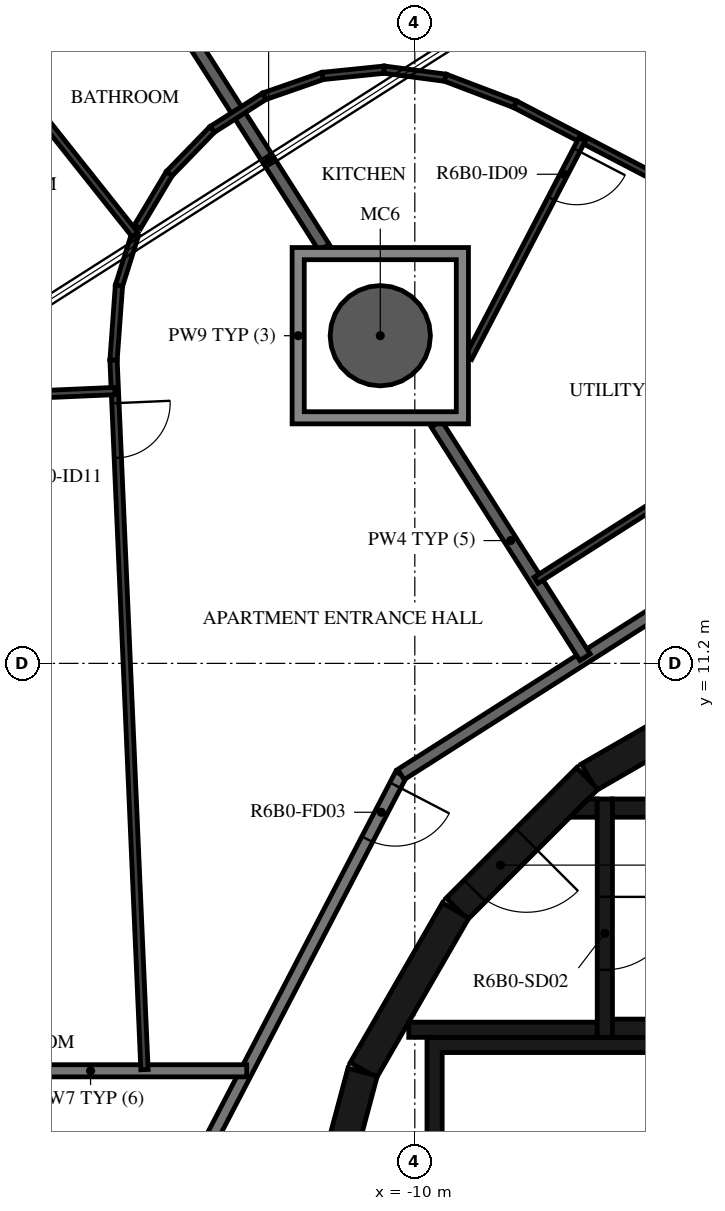
"""IFC4 building model, lengths in metres.
Left out: names, types, materials, properties, quantities, classifications, styles, units other than length and angle.
Written with IfcOpenShell. Run it as: python <this file> out.ifc"""

import sys

from ifc_helpers import new_model, si_unit, direction, frame, frame_2d, origin, origin_2d, place, context, subcontext, project, spatial, polyline, rectangle, hollow_circle, outline, extrude, element, fill, save


model = new_model("IFC4")
c1 = context("Model", 3, precision=1e-05, world=origin(), true_north=direction((0.0, 1.0)))
c2 = subcontext(c1, "Body", "Model", "MODEL_VIEW")
j1 = project(units=[si_unit("LENGTHUNIT", "METRE"), si_unit("PLANEANGLEUNIT", "RADIAN")], contexts=[c1])
p1 = place(None, origin())
s1 = spatial("IfcSite", under=j1, at=p1, CompositionType="ELEMENT")
p2 = place(p1, origin())
s2 = spatial("IfcBuilding", under=s1, at=p2, CompositionType="ELEMENT")
p3 = place(p2, frame((0.0, 0.0, 240.7)))
s3 = spatial("IfcBuildingStorey", under=s2, at=p3, CompositionType="ELEMENT", Elevation=240.7)
p4 = place(p3, frame((-10.568, 16.588, -0.38), z_axis=(0.0, 0.0, 1.0), x_axis=(1.0, 0.0, 0.0)))
e1 = element("IfcColumn", 1, at=p4, inside=s3, PredefinedType="COLUMN", context=c2, shape_type="SweptSolid", body=[
    extrude(hollow_circle(Radius=0.825, WallThickness=0.04, at=origin_2d()), origin(), (0.0, 0.0, 1.0), 3.5),
])
p5 = place(p3, frame((-4.51, 10.845, 0.0), z_axis=(0.0, 0.0, 1.0), x_axis=(-0.865975092491, -0.500087131594, 0.0)))
e2 = element("IfcWall", 2, at=p5, inside=s3, PredefinedType="SHEAR", context=c2, shape_type="SweptSolid", body=[
    extrude(rectangle(XDim=3.033, YDim=0.5, at=frame_2d((1.516, 0.0))), origin(), (0.0, 0.0, 1.0), 3.12),
])
p6 = place(p3, frame((-7.164, 9.308, 0.0), z_axis=(0.0, 0.0, 1.0), x_axis=(-0.707106781187, -0.707106781187, 0.0)))
e3 = element("IfcWall", 3, at=p6, inside=s3, PredefinedType="SHEAR", context=c2, shape_type="SweptSolid", body=[
    extrude(rectangle(XDim=3.032, YDim=0.5, at=frame_2d((1.516, 0.0))), origin(), (0.0, 0.0, 1.0), 3.12),
])
p7 = place(p6, frame((1.416, 0.0, 0.0)))
e4 = element("IfcOpeningElement", 4, at=p7, cuts=e3, PredefinedType="OPENING", context=c2, shape_type="SweptSolid", body=[
    extrude(rectangle(XDim=1.2, YDim=2.1, at=frame_2d((0.6, 1.05))), frame((0.0, 0.26, 0.0), z_axis=(0.0, -1.0, 0.0), x_axis=(1.0, 0.0, 0.0)), (0.0, 0.0, 1.0), 0.52),
])
for number, where, z_axis, x_axis in (
    (5, (-9.329, 7.137, 0.0), (0.0, 0.0, 1.0), (-0.5, -0.866, 0.0)),
    (6, (-10.858, 4.479, 0.0), (0.0, 0.0, 1.0), (-0.259, -0.966, 0.0)),
):
    element("IfcWall", number, at=place(p3, frame(where, z_axis=z_axis, x_axis=x_axis)), inside=s3, PredefinedType="SHEAR", context=c2, shape_type="SweptSolid", body=[
        extrude(rectangle(XDim=3.033, YDim=0.5, at=frame_2d((1.516, 0.0))), origin(), (0.0, 0.0, 1.0), 3.12),
    ])
for number, where, z_axis, x_axis in (
    (7, (-6.75, 5.2, 0.0), (0.0, 0.0, 1.0), (1.0, 0.0, 0.0)),
    (8, (-6.75, 8.82, 0.0), (0.0, 0.0, 1.0), (1.0, 0.0, 0.0)),
):
    element("IfcWall", number, at=place(p3, frame(where, z_axis=z_axis, x_axis=x_axis)), inside=s3, PredefinedType="SHEAR", context=c2, shape_type="SweptSolid", body=[
        extrude(rectangle(XDim=6.75, YDim=0.3, at=frame_2d((3.375, 0.0))), origin(), (0.0, 0.0, 1.0), 3.12),
    ])
p8 = place(p3, frame((-6.875, 8.97, 0.0), z_axis=(0.0, 0.0, 1.0), x_axis=(0.0, -1.0, 0.0)))
e9 = element("IfcWall", 9, at=p8, inside=s3, PredefinedType="SHEAR", context=c2, shape_type="SweptSolid", body=[
    extrude(rectangle(XDim=3.92, YDim=0.25, at=frame_2d((1.96, 0.0))), origin(), (0.0, 0.0, 1.0), 3.12),
])
p9 = place(p8, frame((1.61, 0.0, 0.0)))
e10 = element("IfcOpeningElement", 10, at=p9, cuts=e9, PredefinedType="OPENING", context=c2, shape_type="SweptSolid", body=[
    extrude(rectangle(XDim=1.2, YDim=2.1, at=frame_2d((0.6, 1.05))), frame((0.0, 0.135, 0.0), z_axis=(0.0, -1.0, 0.0), x_axis=(1.0, 0.0, 0.0)), (0.0, 0.0, 1.0), 0.27),
])
p10 = place(p3, frame((-7.0, 5.175, 0.0), z_axis=(0.0, 0.0, 1.0), x_axis=(-1.0, 0.0, 0.0)))
e11 = element("IfcWall", 11, at=p10, inside=s3, PredefinedType="SHEAR", context=c2, shape_type="SweptSolid", body=[
    extrude(rectangle(XDim=3.1, YDim=0.25, at=frame_2d((1.55, 0.0))), origin(), (0.0, 0.0, 1.0), 3.12),
])
p11 = place(p3, origin())
e12 = element("IfcWall", 12, at=p11, inside=s3, PredefinedType="SHEAR", context=c2, shape_type="SweptSolid", body=[
    extrude(outline(polyline([(-7.148, 8.97), (-7.0, 8.97), (-7.0, 8.67), (-7.448, 8.67), (-7.148, 8.97)])), origin(), (0.0, 0.0, 1.0), 3.12),
])
p12 = place(p3, origin())
e13 = element("IfcWall", 13, at=p12, inside=s3, PredefinedType="SHEAR", context=c2, shape_type="SweptSolid", body=[
    extrude(outline(polyline([(-9.55, 4.8), (-5.5, 4.8), (-5.5, 1.9), (-5.25, 1.9), (-5.25, 4.8), (-1.2, 4.8), (-1.2, 1.9), (-0.95, 1.9), (-0.95, 4.8), (0.95, 4.8), (0.95, 1.9), (1.2, 1.9), (1.2, 4.8), (3.1, 4.8), (3.1, 1.9), (3.35, 1.9), (3.35, 4.8), (5.25, 4.8), (5.25, 1.9), (5.5, 1.9), (5.5, 4.8), (7.4, 4.8), (7.4, 1.9), (7.65, 1.9), (7.65, 4.8), (9.55, 4.8), (9.55, 1.9), (9.8, 1.9), (9.8, 4.8), (9.8, 5.05), (-9.8, 5.05), (-9.8, 4.8), (-9.8, 1.9), (-9.55, 1.9), (-9.55, 4.8)])), origin(), (0.0, 0.0, 1.0), 3.12),
])
p13 = place(p3, frame((-10.228, 9.372, 0.0), z_axis=(0.0, 0.0, 1.0), x_axis=(-0.461759464021, -0.887005184532, 0.0)))
e14 = element("IfcWall", 14, at=p13, inside=s3, PredefinedType="STANDARD", context=c2, shape_type="SweptSolid", body=[
    extrude(rectangle(XDim=7.181, YDim=0.2, at=frame_2d((3.591, 0.0))), origin(), (0.0, 0.0, 1.0), 3.12),
])
p14 = place(p13, frame((0.2, 0.0, 0.0)))
e15 = element("IfcOpeningElement", 15, at=p14, cuts=e14, PredefinedType="OPENING", context=c2, shape_type="SweptSolid", body=[
    extrude(rectangle(XDim=1.0, YDim=2.1, at=frame_2d((0.5, 1.05))), frame((0.0, 0.11, 0.0), z_axis=(0.0, -1.0, 0.0), x_axis=(1.0, 0.0, 0.0)), (0.0, 0.0, 1.0), 0.22),
])
p15 = place(p3, frame((-4.172, 13.231, 0.0), z_axis=(0.0, 0.0, 1.0), x_axis=(-0.843388394728, -0.537304397561, 0.0)))
e16 = element("IfcWall", 16, at=p15, inside=s3, PredefinedType="STANDARD", context=c2, shape_type="SweptSolid", body=[
    extrude(rectangle(XDim=7.181, YDim=0.2, at=frame_2d((3.59, 0.0))), origin(), (0.0, 0.0, 1.0), 3.12),
])
p16 = place(p3, frame((-12.764, 4.5, 0.0), z_axis=(0.0, 0.0, 1.0), x_axis=(-1.0, 0.0, 0.0)))
e17 = element("IfcWall", 17, at=p16, inside=s3, PredefinedType="STANDARD", context=c2, shape_type="SweptSolid", body=[
    extrude(rectangle(XDim=5.135, YDim=0.2, at=frame_2d((2.568, 0.0))), origin(), (0.0, 0.0, 1.0), 3.12),
])
p17 = place(p3, frame((-9.645, 15.138, 0.0), z_axis=(0.0, 0.0, 1.0), x_axis=(0.537267800866, -0.84341170857, 0.0)))
e18 = element("IfcWall", 18, at=p17, inside=s3, PredefinedType="STANDARD", context=c2, shape_type="SweptSolid", body=[
    extrude(rectangle(XDim=4.55, YDim=0.2, at=frame_2d((2.275, 0.0))), origin(), (0.0, 0.0, 1.0), 3.12),
])
p18 = place(p3, frame((-14.837, 23.29, 0.0), z_axis=(0.0, 0.0, 1.0), x_axis=(0.537316863221, -0.843380452998, 0.0)))
e19 = element("IfcWall", 19, at=p18, inside=s3, PredefinedType="STANDARD", context=c2, shape_type="SweptSolid", body=[
    extrude(rectangle(XDim=6.227, YDim=0.2, at=frame_2d((3.113, 0.0))), origin(), (0.0, 0.0, 1.0), 3.12),
])
p19 = place(p3, frame((-4.639, 14.712, 0.0), z_axis=(0.0, 0.0, 1.0), x_axis=(-0.843376843237, -0.537322529113, 0.0)))
e20 = element("IfcWall", 20, at=p19, inside=s3, PredefinedType="PARTITIONING", context=c2, shape_type="SweptSolid", body=[
    extrude(rectangle(XDim=3.992, YDim=0.12, at=frame_2d((1.996, 0.0))), origin(), (0.0, 0.0, 1.0), 3.12),
])
p20 = place(p19, frame((0.2, 0.0, 0.0)))
e21 = element("IfcOpeningElement", 21, at=p20, cuts=e20, PredefinedType="OPENING", context=c2, shape_type="SweptSolid", body=[
    extrude(rectangle(XDim=0.9, YDim=2.1, at=frame_2d((0.45, 1.05))), frame((0.0, 0.07, 0.0), z_axis=(0.0, -1.0, 0.0), x_axis=(1.0, 0.0, 0.0)), (0.0, 0.0, 1.0), 0.14),
])
p21 = place(p3, frame((-8.35, 20.394, 0.0), z_axis=(0.0, 0.0, 1.0), x_axis=(0.887020940825, -0.461729196107, 0.0)))
e22 = element("IfcWall", 22, at=p21, inside=s3, PredefinedType="PARTITIONING", context=c2, shape_type="SweptSolid", body=[
    extrude(rectangle(XDim=11.678, YDim=0.12, at=frame_2d((5.839, 0.0))), origin(), (0.0, 0.0, 1.0), 3.12),
])
p22 = place(p21, frame((3.469, 0.0, 0.0)))
e23 = element("IfcOpeningElement", 23, at=p22, cuts=e22, PredefinedType="OPENING", context=c2, shape_type="SweptSolid", body=[
    extrude(rectangle(XDim=0.9, YDim=2.1, at=frame_2d((0.45, 1.05))), frame((0.0, 0.07, 0.0), z_axis=(0.0, -1.0, 0.0), x_axis=(1.0, 0.0, 0.0)), (0.0, 0.0, 1.0), 0.14),
])
p23 = place(p3, frame((-6.237, 23.353, 0.0), z_axis=(0.0, 0.0, 1.0), x_axis=(0.181909323114, -0.983315309636, 0.0)))
e24 = element("IfcWall", 24, at=p23, inside=s3, PredefinedType="PARTITIONING", context=c2, shape_type="SweptSolid", body=[
    extrude(rectangle(XDim=4.567, YDim=0.12, at=frame_2d((2.284, 0.0))), origin(), (0.0, 0.0, 1.0), 3.12),
])
p24 = place(p23, frame((0.6, 0.0, 0.0)))
e25 = element("IfcOpeningElement", 25, at=p24, cuts=e24, PredefinedType="OPENING", context=c2, shape_type="SweptSolid", body=[
    extrude(rectangle(XDim=0.9, YDim=2.1, at=frame_2d((0.45, 1.05))), frame((0.0, 0.07, 0.0), z_axis=(0.0, -1.0, 0.0), x_axis=(1.0, 0.0, 0.0)), (0.0, 0.0, 1.0), 0.14),
])
p25 = place(p3, frame((-7.247, 19.82, 0.0), z_axis=(0.0, 0.0, 1.0), x_axis=(-0.461733980956, -0.887018450107, 0.0)))
e26 = element("IfcWall", 26, at=p25, inside=s3, PredefinedType="PARTITIONING", context=c2, shape_type="SweptSolid", body=[
    extrude(rectangle(XDim=4.052, YDim=0.12, at=frame_2d((2.026, 0.0))), origin(), (0.0, 0.0, 1.0), 3.12),
])
p26 = place(p25, frame((0.2, 0.0, 0.0)))
e27 = element("IfcOpeningElement", 27, at=p26, cuts=e26, PredefinedType="OPENING", context=c2, shape_type="SweptSolid", body=[
    extrude(rectangle(XDim=0.9, YDim=2.1, at=frame_2d((0.45, 1.05))), frame((0.0, 0.07, 0.0), z_axis=(0.0, -1.0, 0.0), x_axis=(1.0, 0.0, 0.0)), (0.0, 0.0, 1.0), 0.14),
])
for number, where, z_axis, x_axis in (
    (28, (-13.332, 19.981, 0.0), (0.0, 0.0, 1.0), (0.843, 0.537, 0.0)),
    (29, (-12.475, 20.527, 0.0), (0.0, 0.0, 1.0), (0.945, 0.328, 0.0)),
):
    element("IfcWall", number, at=place(p3, frame(where, z_axis=z_axis, x_axis=x_axis)), inside=s3, PredefinedType="PARTITIONING", context=c2, shape_type="SweptSolid", body=[
        extrude(rectangle(XDim=1.016, YDim=0.12, at=frame_2d((0.508, 0.0))), origin(), (0.0, 0.0, 1.0), 3.12),
    ])
p27 = place(p3, frame((-11.515, 20.86, 0.0), z_axis=(0.0, 0.0, 1.0), x_axis=(0.994818278641, 0.101669034034, 0.0)))
e30 = element("IfcWall", 30, at=p27, inside=s3, PredefinedType="PARTITIONING", context=c2, shape_type="SweptSolid", body=[
    extrude(rectangle(XDim=1.016, YDim=0.12, at=frame_2d((0.508, 0.0))), origin(), (0.0, 0.0, 1.0), 3.12),
])
p28 = place(p3, frame((-10.504, 20.963, 0.0), z_axis=(0.0, 0.0, 1.0), x_axis=(0.991451023706, -0.13047937612, 0.0)))
e31 = element("IfcWall", 31, at=p28, inside=s3, PredefinedType="PARTITIONING", context=c2, shape_type="SweptSolid", body=[
    extrude(rectangle(XDim=1.016, YDim=0.12, at=frame_2d((0.508, 0.0))), origin(), (0.0, 0.0, 1.0), 3.12),
])
p29 = place(p3, frame((-9.497, 20.831, 0.0), z_axis=(0.0, 0.0, 1.0), x_axis=(0.934575963521, -0.355763641213, 0.0)))
e32 = element("IfcWall", 32, at=p29, inside=s3, PredefinedType="PARTITIONING", context=c2, shape_type="SweptSolid", body=[
    extrude(rectangle(XDim=1.227, YDim=0.12, at=frame_2d((0.614, 0.0))), origin(), (0.0, 0.0, 1.0), 3.12),
])
for number, where, z_axis, x_axis in (
    (33, (-13.332, 19.981, 0.0), (0.0, 0.0, 1.0), (-0.697, -0.717, 0.0)),
    (34, (-14.039, 19.252, 0.0), (0.0, 0.0, 1.0), (-0.513, -0.859, 0.0)),
):
    element("IfcWall", number, at=place(p3, frame(where, z_axis=z_axis, x_axis=x_axis)), inside=s3, PredefinedType="PARTITIONING", context=c2, shape_type="SweptSolid", body=[
        extrude(rectangle(XDim=1.016, YDim=0.12, at=frame_2d((0.508, 0.0))), origin(), (0.0, 0.0, 1.0), 3.12),
    ])
p30 = place(p3, frame((-14.601, 18.25, 0.0), z_axis=(0.0, 0.0, 1.0), x_axis=(-0.300706496876, -0.953716730867, 0.0)))
e35 = element("IfcWall", 35, at=p30, inside=s3, PredefinedType="PARTITIONING", context=c2, shape_type="SweptSolid", body=[
    extrude(rectangle(XDim=0.88, YDim=0.12, at=frame_2d((0.44, 0.0))), origin(), (0.0, 0.0, 1.0), 3.12),
])
p31 = place(p3, frame((-14.865, 17.411, 0.0), z_axis=(0.0, 0.0, 1.0), x_axis=(-0.072618457011, -0.997359794508, 0.0)))
e36 = element("IfcWall", 36, at=p31, inside=s3, PredefinedType="PARTITIONING", context=c2, shape_type="SweptSolid", body=[
    extrude(rectangle(XDim=1.227, YDim=0.12, at=frame_2d((0.614, 0.0))), origin(), (0.0, 0.0, 1.0), 3.12),
])
p32 = place(p3, frame((-14.955, 16.187, 0.0), z_axis=(0.0, 0.0, 1.0), x_axis=(0.04360777668, -0.999048728448, 0.0)))
e37 = element("IfcWall", 37, at=p32, inside=s3, PredefinedType="PARTITIONING", context=c2, shape_type="SweptSolid", body=[
    extrude(rectangle(XDim=11.679, YDim=0.12, at=frame_2d((5.839, 0.0))), origin(), (0.0, 0.0, 1.0), 3.12),
])
p33 = place(p32, frame((0.709, 0.0, 0.0)))
e38 = element("IfcOpeningElement", 38, at=p33, cuts=e37, PredefinedType="OPENING", context=c2, shape_type="SweptSolid", body=[
    extrude(rectangle(XDim=0.9, YDim=2.1, at=frame_2d((0.45, 1.05))), frame((0.0, 0.07, 0.0), z_axis=(0.0, -1.0, 0.0), x_axis=(1.0, 0.0, 0.0)), (0.0, 0.0, 1.0), 0.14),
])
p34 = place(p3, frame((-17.015, 21.29, 0.0), z_axis=(0.0, 0.0, 1.0), x_axis=(0.621976289729, -0.783036075168, 0.0)))
e39 = element("IfcWall", 39, at=p34, inside=s3, PredefinedType="PARTITIONING", context=c2, shape_type="SweptSolid", body=[
    extrude(rectangle(XDim=3.882, YDim=0.12, at=frame_2d((1.941, 0.0))), origin(), (0.0, 0.0, 1.0), 3.12),
])
p35 = place(p34, frame((0.2, 0.0, 0.0)))
e40 = element("IfcOpeningElement", 40, at=p35, cuts=e39, PredefinedType="OPENING", context=c2, shape_type="SweptSolid", body=[
    extrude(rectangle(XDim=0.8, YDim=2.1, at=frame_2d((0.4, 1.05))), frame((0.0, 0.07, 0.0), z_axis=(0.0, -1.0, 0.0), x_axis=(1.0, 0.0, 0.0)), (0.0, 0.0, 1.0), 0.14),
])
p36 = place(p3, frame((-18.529, 15.522, 0.0), z_axis=(0.0, 0.0, 1.0), x_axis=(0.999048722018, 0.043607923987, 0.0)))
e41 = element("IfcWall", 41, at=p36, inside=s3, PredefinedType="PARTITIONING", context=c2, shape_type="SweptSolid", body=[
    extrude(rectangle(XDim=3.6, YDim=0.12, at=frame_2d((1.8, 0.0))), origin(), (0.0, 0.0, 1.0), 2.73),
])
p37 = place(p36, frame((0.2, 0.0, 0.0)))
e42 = element("IfcOpeningElement", 42, at=p37, cuts=e41, PredefinedType="OPENING", context=c2, shape_type="SweptSolid", body=[
    extrude(rectangle(XDim=0.9, YDim=2.1, at=frame_2d((0.45, 1.05))), frame((0.0, 0.07, 0.0), z_axis=(0.0, -1.0, 0.0), x_axis=(1.0, 0.0, 0.0)), (0.0, 0.0, 1.0), 0.14),
])
p38 = place(p3, origin())
e43 = element("IfcWall", 43, at=p38, inside=s3, PredefinedType="STANDARD", context=c2, shape_type="SweptSolid", body=[
    extrude(outline(polyline([(-9.118, 18.038), (-9.118, 15.138), (-12.018, 15.138), (-12.018, 18.038), (-9.118, 18.038)]), holes=[polyline([(-11.818, 15.338), (-9.318, 15.338), (-9.318, 17.838), (-11.818, 17.838), (-11.818, 15.338)])]), origin(), (0.0, 0.0, 1.0), 3.12),
])
p39 = place(p9, origin())
e44 = element("IfcDoor", 44, at=p39, inside=s3, OperationType="SINGLE_SWING_LEFT", PredefinedType="DOOR", context=c2, shape_type="SweptSolid", body=[
    extrude(rectangle(XDim=1.2, YDim=2.1, at=frame_2d((0.6, 1.05))), frame((0.0, 0.025, 0.0), z_axis=(0.0, -1.0, 0.0), x_axis=(1.0, 0.0, 0.0)), (0.0, 0.0, 1.0), 0.05),
])
fill(e10, e44)
p40 = place(p7, origin())
e45 = element("IfcDoor", 45, at=p40, inside=s3, OperationType="SINGLE_SWING_RIGHT", PredefinedType="DOOR", context=c2, shape_type="SweptSolid", body=[
    extrude(rectangle(XDim=1.2, YDim=2.1, at=frame_2d((0.6, 1.05))), frame((0.0, 0.025, 0.0), z_axis=(0.0, -1.0, 0.0), x_axis=(1.0, 0.0, 0.0)), (0.0, 0.0, 1.0), 0.05),
])
fill(e4, e45)
p41 = place(p26, origin())
e46 = element("IfcDoor", 46, at=p41, inside=s3, OperationType="SINGLE_SWING_RIGHT", PredefinedType="DOOR", context=c2, shape_type="SweptSolid", body=[
    extrude(rectangle(XDim=0.9, YDim=2.1, at=frame_2d((0.45, 1.05))), frame((0.0, 0.025, 0.0), z_axis=(0.0, -1.0, 0.0), x_axis=(1.0, 0.0, 0.0)), (0.0, 0.0, 1.0), 0.05),
])
fill(e27, e46)
p42 = place(p14, origin())
e47 = element("IfcDoor", 47, at=p42, inside=s3, OperationType="SINGLE_SWING_LEFT", PredefinedType="DOOR", context=c2, shape_type="SweptSolid", body=[
    extrude(rectangle(XDim=1.0, YDim=2.1, at=frame_2d((0.5, 1.05))), frame((0.0, 0.025, 0.0), z_axis=(0.0, -1.0, 0.0), x_axis=(1.0, 0.0, 0.0)), (0.0, 0.0, 1.0), 0.05),
])
fill(e15, e47)
p43 = place(p33, origin())
e48 = element("IfcDoor", 48, at=p43, inside=s3, OperationType="SINGLE_SWING_LEFT", PredefinedType="DOOR", context=c2, shape_type="SweptSolid", body=[
    extrude(rectangle(XDim=0.9, YDim=2.1, at=frame_2d((0.45, 1.05))), frame((0.0, 0.025, 0.0), z_axis=(0.0, -1.0, 0.0), x_axis=(1.0, 0.0, 0.0)), (0.0, 0.0, 1.0), 0.05),
])
fill(e38, e48)
save(model, sys.argv[1])
